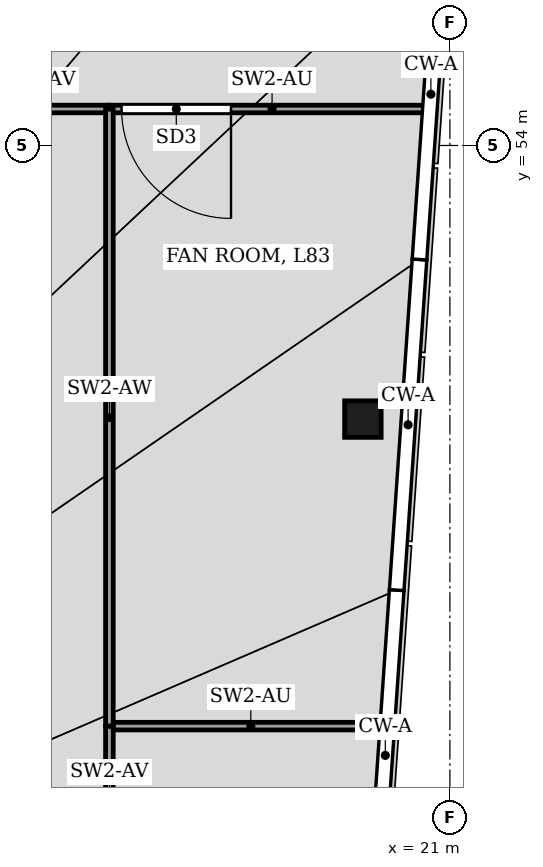
"""IFC4 building model, lengths in metres.
Left out: names, types, materials, properties, quantities, classifications, styles, units other than length and angle.
Written with IfcOpenShell. Run it as: python <this file> out.ifc"""

import sys

from ifc_helpers import new_model, si_unit, direction, frame, frame_2d, origin, origin_2d, place, context, subcontext, project, spatial, rectangle, hollow_rectangle, extrude, element, fill, save


model = new_model("IFC4")
c1 = context("Model", 3, precision=1e-05, world=origin(), true_north=direction((0.0, 1.0)))
c2 = subcontext(c1, "Body", "Model", "MODEL_VIEW")
j1 = project(units=[si_unit("LENGTHUNIT", "METRE"), si_unit("PLANEANGLEUNIT", "RADIAN")], contexts=[c1])
p1 = place(None, origin())
s1 = spatial("IfcSite", under=j1, at=p1, CompositionType="ELEMENT")
p2 = place(p1, origin())
s2 = spatial("IfcBuilding", under=s1, at=p2, CompositionType="ELEMENT")
p3 = place(p2, frame((0.0, 0.0, 368.0)))
s3 = spatial("IfcBuildingStorey", under=s2, at=p3, CompositionType="ELEMENT", Elevation=368.0)
p4 = place(p3, frame((19.569, 49.5, 0.0), z_axis=(0.0, 0.0, 1.0), x_axis=(1.0, 0.0, 0.0)))
e1 = element("IfcColumn", 1, at=p4, inside=s3, PredefinedType="COLUMN", context=c2, shape_type="SweptSolid", body=[
    extrude(hollow_rectangle(XDim=0.6, YDim=0.6, WallThickness=0.025, at=origin_2d()), origin(), (0.0, 0.0, 1.0), 3.3),
])
p5 = place(p3, frame((20.751, 54.6, 0.0), z_axis=(0.0, 0.0, 1.0), x_axis=(-1.0, 0.0, 0.0)))
e2 = element("IfcWall", 2, at=p5, inside=s3, PredefinedType="PARTITIONING", context=c2, shape_type="SweptSolid", body=[
    extrude(rectangle(XDim=5.351, YDim=0.125, at=frame_2d((2.675, 0.0))), origin(), (0.0, 0.0, 1.0), 2.47),
])
p6 = place(p5, frame((3.351, 0.0, 0.0)))
e3 = element("IfcOpeningElement", 3, at=p6, cuts=e2, PredefinedType="OPENING", context=c2, shape_type="SweptSolid", body=[
    extrude(rectangle(XDim=1.8, YDim=2.4, at=frame_2d((0.9, 1.2))), frame((0.0, 0.073, 0.0), z_axis=(0.0, -1.0, 0.0), x_axis=(1.0, 0.0, 0.0)), (0.0, 0.0, 1.0), 0.145),
])
p7 = place(p3, frame((15.4, 44.45, 0.0), z_axis=(0.0, 0.0, 1.0), x_axis=(1.0, 0.0, 0.0)))
e4 = element("IfcWall", 4, at=p7, inside=s3, PredefinedType="PARTITIONING", context=c2, shape_type="SweptSolid", body=[
    extrude(rectangle(XDim=4.651, YDim=0.125, at=frame_2d((2.325, 0.0))), origin(), (0.0, 0.0, 1.0), 2.47),
])
p8 = place(p3, frame((15.398, 54.6, 0.0), z_axis=(0.0, 0.0, 1.0), x_axis=(-1.0, 0.0, 0.0)))
e5 = element("IfcWall", 5, at=p8, inside=s3, PredefinedType="PARTITIONING", context=c2, shape_type="SweptSolid", body=[
    extrude(rectangle(XDim=2.398, YDim=0.125, at=frame_2d((1.199, 0.0))), origin(), (0.0, 0.0, 1.0), 3.3),
])
p9 = place(p3, frame((15.4, 42.002, 0.0), z_axis=(0.0, 0.0, 1.0), x_axis=(0.0, 1.0, 0.0)))
e6 = element("IfcWall", 6, at=p9, inside=s3, PredefinedType="PARTITIONING", context=c2, shape_type="SweptSolid", body=[
    extrude(rectangle(XDim=2.446, YDim=0.125, at=frame_2d((1.223, 0.0))), origin(), (0.0, 0.0, 1.0), 3.3),
])
p10 = place(p3, frame((15.4, 44.452, 0.0), z_axis=(0.0, 0.0, 1.0), x_axis=(0.0, 1.0, 0.0)))
e7 = element("IfcWall", 7, at=p10, inside=s3, PredefinedType="PARTITIONING", context=c2, shape_type="SweptSolid", body=[
    extrude(rectangle(XDim=10.146, YDim=0.125, at=frame_2d((5.073, 0.0))), origin(), (0.0, 0.0, 1.0), 2.78),
])
p11 = place(p6, origin())
e8 = element("IfcDoor", 8, at=p11, inside=s3, OperationType="DOUBLE_DOOR_SINGLE_SWING", PredefinedType="DOOR", context=c2, shape_type="SweptSolid", body=[
    extrude(rectangle(XDim=1.8, YDim=2.4, at=frame_2d((0.9, 1.2))), frame((0.0, 0.025, 0.0), z_axis=(0.0, -1.0, 0.0), x_axis=(1.0, 0.0, 0.0)), (0.0, 0.0, 1.0), 0.05),
])
fill(e3, e8)
save(model, sys.argv[1])
